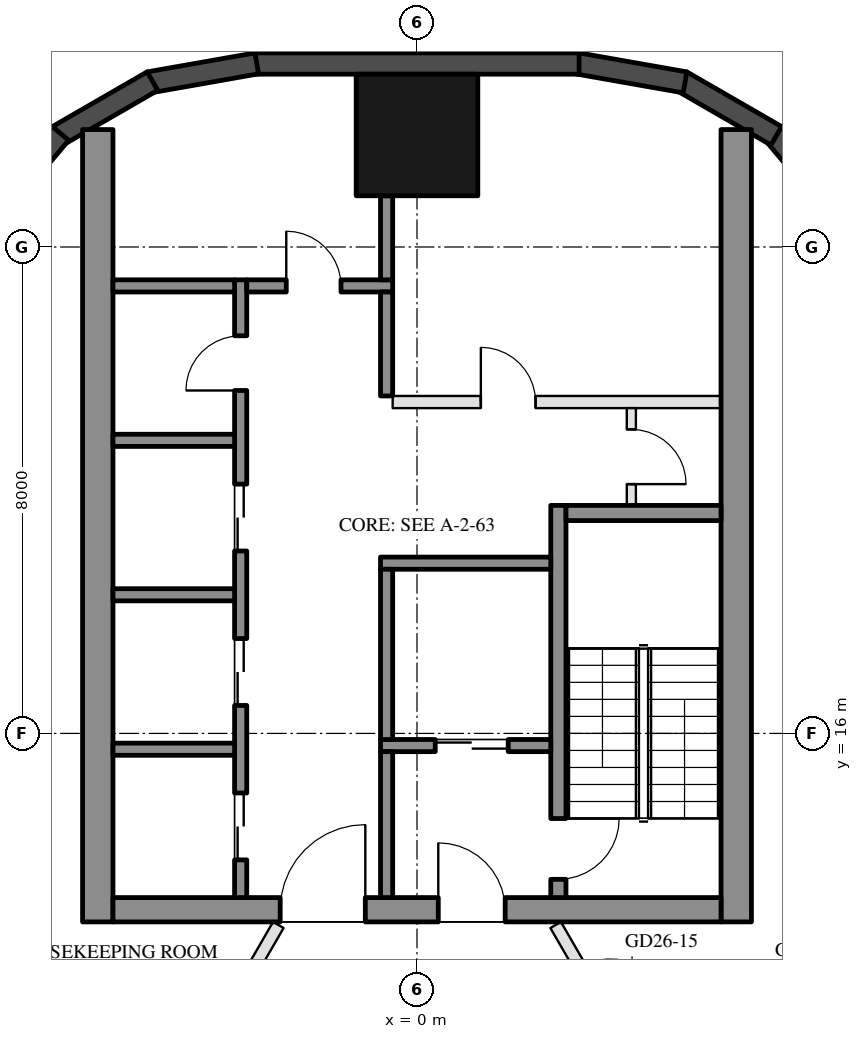
"""IFC4 building model, lengths in metres.
Left out: names, types, materials, properties, quantities, classifications, styles, units other than length and angle.
Written with IfcOpenShell. Run it as: python <this file> out.ifc"""

import sys

from ifc_helpers import new_model, si_unit, direction, frame, frame_2d, origin, origin_2d, place, context, subcontext, project, spatial, rectangle, hollow_rectangle, extrude, boolean, halfspace, element, fill, save


model = new_model("IFC4")
c1 = context("Model", 3, precision=1e-05, world=origin(), true_north=direction((0.0, 1.0)))
c2 = subcontext(c1, "Body", "Model", "MODEL_VIEW")
j1 = project(units=[si_unit("LENGTHUNIT", "METRE"), si_unit("PLANEANGLEUNIT", "RADIAN")], contexts=[c1])
p1 = place(None, origin())
s1 = spatial("IfcSite", under=j1, at=p1, CompositionType="ELEMENT")
p2 = place(p1, origin())
s2 = spatial("IfcBuilding", under=s1, at=p2, CompositionType="ELEMENT")
p3 = place(p2, frame((0.0, 0.0, 272.6)))
s3 = spatial("IfcBuildingStorey", under=s2, at=p3, CompositionType="ELEMENT", Elevation=272.6)
p4 = place(p3, frame((0.0, 25.843, 0.0), z_axis=(0.0, 0.0, 1.0), x_axis=(1.0, 0.0, 0.0)))
e1 = element("IfcColumn", 1, at=p4, inside=s3, PredefinedType="COLUMN", context=c2, shape_type="SweptSolid", body=[
    boolean("DIFFERENCE", extrude(hollow_rectangle(XDim=2.0, YDim=2.0, WallThickness=0.05, at=origin_2d()), origin(), (0.0, 0.0, 1.0), 3.7), halfspace(frame((0.0, 0.0, 3.587), z_axis=(0.0, 0.0, 1.0), x_axis=(1.0, 0.0, 0.0)), False)),
])
p5 = place(p3, frame((7.019, 24.489, 0.0), z_axis=(0.0, 0.0, 1.0), x_axis=(-0.642756114672, 0.766070869471, 0.0)))
e2 = element("IfcWall", 2, at=p5, inside=s3, PredefinedType="SOLIDWALL", context=c2, shape_type="SweptSolid", body=[
    extrude(rectangle(XDim=1.8, YDim=0.35, at=frame_2d((0.9, 0.0))), origin(), (0.0, 0.0, 1.0), 3.55),
])
for number, where, z_axis, x_axis in (
    (3, (5.909, 25.829, 0.0), (0.0, 0.0, 1.0), (-0.866, 0.5, 0.0)),
    (4, (4.408, 26.708, 0.0), (0.0, 0.0, 1.0), (-0.985, 0.174, 0.0)),
):
    element("IfcWall", number, at=place(p3, frame(where, z_axis=z_axis, x_axis=x_axis)), inside=s3, PredefinedType="SOLIDWALL", context=c2, shape_type="SweptSolid", body=[
        extrude(rectangle(XDim=1.8, YDim=0.35, at=frame_2d((0.9, 0.0))), origin(), (0.0, 0.0, 1.0), 3.55),
    ])
p6 = place(p3, frame((2.666, 27.018, 0.0), z_axis=(0.0, 0.0, 1.0), x_axis=(-1.0, 0.0, 0.0)))
e5 = element("IfcWall", 5, at=p6, inside=s3, PredefinedType="SOLIDWALL", context=c2, shape_type="SweptSolid", body=[
    extrude(rectangle(XDim=5.331, YDim=0.35, at=frame_2d((2.666, 0.0))), origin(), (0.0, 0.0, 1.0), 3.55),
])
for number, where, z_axis, x_axis in (
    (6, (-2.635, 27.02, 0.0), (0.0, 0.0, 1.0), (-0.985, -0.174, 0.0)),
    (7, (-4.351, 26.729, 0.0), (0.0, 0.0, 1.0), (-0.866, -0.5, 0.0)),
):
    element("IfcWall", number, at=place(p3, frame(where, z_axis=z_axis, x_axis=x_axis)), inside=s3, PredefinedType="SOLIDWALL", context=c2, shape_type="SweptSolid", body=[
        extrude(rectangle(XDim=1.8, YDim=0.35, at=frame_2d((0.9, 0.0))), origin(), (0.0, 0.0, 1.0), 3.55),
    ])
p7 = place(p3, frame((-5.863, 25.868, 0.0), z_axis=(0.0, 0.0, 1.0), x_axis=(-0.642756114672, -0.766070869471, 0.0)))
e8 = element("IfcWall", 8, at=p7, inside=s3, PredefinedType="SOLIDWALL", context=c2, shape_type="SweptSolid", body=[
    extrude(rectangle(XDim=1.8, YDim=0.35, at=frame_2d((0.9, 0.0))), origin(), (0.0, 0.0, 1.0), 3.55),
])
for number, where, z_axis, x_axis in (
    (9, (5.25, 12.9, 0.0), (0.0, 0.0, 1.0), (0.0, 1.0, 0.0)),
    (10, (-5.25, 12.9, 0.0), (0.0, 0.0, 1.0), (0.0, 1.0, 0.0)),
):
    element("IfcWall", number, at=place(p3, frame(where, z_axis=z_axis, x_axis=x_axis)), inside=s3, PredefinedType="SHEAR", context=c2, shape_type="SweptSolid", body=[
        extrude(rectangle(XDim=13.031, YDim=0.5, at=frame_2d((6.516, 0.0))), origin(), (0.0, 0.0, 1.0), 3.5),
    ])
p8 = place(p3, frame((5.0, 13.1, 0.0), z_axis=(0.0, 0.0, 1.0), x_axis=(-1.0, 0.0, 0.0)))
e11 = element("IfcWall", 11, at=p8, inside=s3, PredefinedType="SHEAR", context=c2, shape_type="SweptSolid", body=[
    extrude(rectangle(XDim=10.0, YDim=0.4, at=frame_2d((5.0, 0.0))), origin(), (0.0, 0.0, 1.0), 3.5),
])
p9 = place(p8, frame((3.55, 0.0, 0.0)))
e12 = element("IfcOpeningElement", 12, at=p9, cuts=e11, PredefinedType="OPENING", context=c2, shape_type="SweptSolid", body=[
    extrude(rectangle(XDim=1.1, YDim=2.1, at=frame_2d((0.55, 1.05))), frame((0.0, 0.21, 0.0), z_axis=(0.0, -1.0, 0.0), x_axis=(1.0, 0.0, 0.0)), (0.0, 0.0, 1.0), 0.42),
])
p10 = place(p8, frame((5.85, 0.0, 0.0)))
e13 = element("IfcOpeningElement", 13, at=p10, cuts=e11, PredefinedType="OPENING", context=c2, shape_type="SweptSolid", body=[
    extrude(rectangle(XDim=1.4, YDim=2.1, at=frame_2d((0.7, 1.05))), frame((0.0, 0.21, 0.0), z_axis=(0.0, -1.0, 0.0), x_axis=(1.0, 0.0, 0.0)), (0.0, 0.0, 1.0), 0.42),
])
p11 = place(p3, frame((2.325, 13.3, 0.0), z_axis=(0.0, 0.0, 1.0), x_axis=(0.0, 1.0, 0.0)))
e14 = element("IfcWall", 14, at=p11, inside=s3, PredefinedType="SHEAR", context=c2, shape_type="SweptSolid", body=[
    extrude(rectangle(XDim=6.45, YDim=0.25, at=frame_2d((3.225, 0.0))), origin(), (0.0, 0.0, 1.0), 3.5),
])
p12 = place(p11, frame((0.3, 0.0, 0.0)))
e15 = element("IfcOpeningElement", 15, at=p12, cuts=e14, PredefinedType="OPENING", context=c2, shape_type="SweptSolid", body=[
    extrude(rectangle(XDim=1.0, YDim=2.1, at=frame_2d((0.5, 1.05))), frame((0.0, 0.135, 0.0), z_axis=(0.0, -1.0, 0.0), x_axis=(1.0, 0.0, 0.0)), (0.0, 0.0, 1.0), 0.27),
])
p13 = place(p3, frame((5.0, 19.625, 0.0), z_axis=(0.0, 0.0, 1.0), x_axis=(-1.0, 0.0, 0.0)))
e16 = element("IfcWall", 16, at=p13, inside=s3, PredefinedType="SHEAR", context=c2, shape_type="SweptSolid", body=[
    extrude(rectangle(XDim=2.55, YDim=0.25, at=frame_2d((1.275, 0.0))), origin(), (0.0, 0.0, 1.0), 3.5),
])
p14 = place(p3, frame((2.2, 18.8, 0.0), z_axis=(0.0, 0.0, 1.0), x_axis=(-1.0, 0.0, 0.0)))
e17 = element("IfcWall", 17, at=p14, inside=s3, PredefinedType="SHEAR", context=c2, shape_type="SweptSolid", body=[
    extrude(rectangle(XDim=2.8, YDim=0.2, at=frame_2d((1.4, 0.0))), origin(), (0.0, 0.0, 1.0), 3.5),
])
p15 = place(p3, frame((2.2, 15.8, 0.0), z_axis=(0.0, 0.0, 1.0), x_axis=(-1.0, 0.0, 0.0)))
e18 = element("IfcWall", 18, at=p15, inside=s3, PredefinedType="SHEAR", context=c2, shape_type="SweptSolid", body=[
    extrude(rectangle(XDim=2.8, YDim=0.2, at=frame_2d((1.4, 0.0))), origin(), (0.0, 0.0, 1.0), 3.5),
])
p16 = place(p15, frame((0.7, 0.0, 0.0)))
e19 = element("IfcOpeningElement", 19, at=p16, cuts=e18, PredefinedType="OPENING", context=c2, shape_type="SweptSolid", body=[
    extrude(rectangle(XDim=1.2, YDim=2.1, at=frame_2d((0.6, 1.05))), frame((0.0, 0.11, 0.0), z_axis=(0.0, -1.0, 0.0), x_axis=(1.0, 0.0, 0.0)), (0.0, 0.0, 1.0), 0.22),
])
p17 = place(p3, frame((-0.5, 15.9, 0.0), z_axis=(0.0, 0.0, 1.0), x_axis=(0.0, 1.0, 0.0)))
e20 = element("IfcWall", 20, at=p17, inside=s3, PredefinedType="SHEAR", context=c2, shape_type="SweptSolid", body=[
    extrude(rectangle(XDim=2.8, YDim=0.2, at=frame_2d((1.4, 0.0))), origin(), (0.0, 0.0, 1.0), 3.5),
])
p18 = place(p3, frame((-0.5, 13.3, 0.0), z_axis=(0.0, 0.0, 1.0), x_axis=(0.0, 1.0, 0.0)))
e21 = element("IfcWall", 21, at=p18, inside=s3, PredefinedType="SHEAR", context=c2, shape_type="SweptSolid", body=[
    extrude(rectangle(XDim=2.4, YDim=0.2, at=frame_2d((1.2, 0.0))), origin(), (0.0, 0.0, 1.0), 3.5),
])
p19 = place(p3, frame((-2.9, 13.3, 0.0), z_axis=(0.0, 0.0, 1.0), x_axis=(0.0, 1.0, 0.0)))
e22 = element("IfcWall", 22, at=p19, inside=s3, PredefinedType="SHEAR", context=c2, shape_type="SweptSolid", body=[
    extrude(rectangle(XDim=10.16, YDim=0.2, at=frame_2d((5.08, 0.0))), origin(), (0.0, 0.0, 1.0), 3.5),
])
p20 = place(p19, frame((0.62, 0.0, 0.0)))
e23 = element("IfcOpeningElement", 23, at=p20, cuts=e22, PredefinedType="OPENING", context=c2, shape_type="SweptSolid", body=[
    extrude(rectangle(XDim=1.1, YDim=2.1, at=frame_2d((0.55, 1.05))), frame((0.0, 0.11, 0.0), z_axis=(0.0, -1.0, 0.0), x_axis=(1.0, 0.0, 0.0)), (0.0, 0.0, 1.0), 0.22),
])
p21 = place(p19, frame((3.16, 0.0, 0.0)))
e24 = element("IfcOpeningElement", 24, at=p21, cuts=e22, PredefinedType="OPENING", context=c2, shape_type="SweptSolid", body=[
    extrude(rectangle(XDim=1.1, YDim=2.1, at=frame_2d((0.55, 1.05))), frame((0.0, 0.11, 0.0), z_axis=(0.0, -1.0, 0.0), x_axis=(1.0, 0.0, 0.0)), (0.0, 0.0, 1.0), 0.22),
])
p22 = place(p19, frame((5.7, 0.0, 0.0)))
e25 = element("IfcOpeningElement", 25, at=p22, cuts=e22, PredefinedType="OPENING", context=c2, shape_type="SweptSolid", body=[
    extrude(rectangle(XDim=1.1, YDim=2.1, at=frame_2d((0.55, 1.05))), frame((0.0, 0.11, 0.0), z_axis=(0.0, -1.0, 0.0), x_axis=(1.0, 0.0, 0.0)), (0.0, 0.0, 1.0), 0.22),
])
p23 = place(p19, frame((8.34, 0.0, 0.0)))
e26 = element("IfcOpeningElement", 26, at=p23, cuts=e22, PredefinedType="OPENING", context=c2, shape_type="SweptSolid", body=[
    extrude(rectangle(XDim=0.9, YDim=2.1, at=frame_2d((0.45, 1.05))), frame((0.0, 0.11, 0.0), z_axis=(0.0, -1.0, 0.0), x_axis=(1.0, 0.0, 0.0)), (0.0, 0.0, 1.0), 0.22),
])
p24 = place(p3, frame((-0.4, 23.36, 0.0), z_axis=(0.0, 0.0, 1.0), x_axis=(-1.0, 0.0, 0.0)))
e27 = element("IfcWall", 27, at=p24, inside=s3, PredefinedType="SHEAR", context=c2, shape_type="SweptSolid", body=[
    extrude(rectangle(XDim=2.4, YDim=0.2, at=frame_2d((1.2, 0.0))), origin(), (0.0, 0.0, 1.0), 3.5),
])
p25 = place(p24, frame((0.85, 0.0, 0.0)))
e28 = element("IfcOpeningElement", 28, at=p25, cuts=e27, PredefinedType="OPENING", context=c2, shape_type="SweptSolid", body=[
    extrude(rectangle(XDim=0.9, YDim=2.1, at=frame_2d((0.45, 1.05))), frame((0.0, 0.11, 0.0), z_axis=(0.0, -1.0, 0.0), x_axis=(1.0, 0.0, 0.0)), (0.0, 0.0, 1.0), 0.22),
])
p26 = place(p3, frame((-0.5, 21.55, 0.0), z_axis=(0.0, 0.0, 1.0), x_axis=(0.0, 1.0, 0.0)))
e29 = element("IfcWall", 29, at=p26, inside=s3, PredefinedType="SHEAR", context=c2, shape_type="SweptSolid", body=[
    extrude(rectangle(XDim=1.71, YDim=0.2, at=frame_2d((0.855, 0.0))), origin(), (0.0, 0.0, 1.0), 3.5),
])
for number, where, z_axis, x_axis in (
    (30, (-3.0, 15.74, 0.0), (0.0, 0.0, 1.0), (-1.0, 0.0, 0.0)),
    (31, (-3.0, 18.28, 0.0), (0.0, 0.0, 1.0), (-1.0, 0.0, 0.0)),
    (32, (-3.0, 20.82, 0.0), (0.0, 0.0, 1.0), (-1.0, 0.0, 0.0)),
    (33, (-3.0, 23.36, 0.0), (0.0, 0.0, 1.0), (-1.0, 0.0, 0.0)),
):
    element("IfcWall", number, at=place(p3, frame(where, z_axis=z_axis, x_axis=x_axis)), inside=s3, PredefinedType="SHEAR", context=c2, shape_type="SweptSolid", body=[
        extrude(rectangle(XDim=2.0, YDim=0.2, at=frame_2d((1.0, 0.0))), origin(), (0.0, 0.0, 1.0), 3.5),
    ])
p27 = place(p3, frame((-0.5, 23.46, 0.0), z_axis=(0.0, 0.0, 1.0), x_axis=(0.0, 1.0, 0.0)))
e34 = element("IfcWall", 34, at=p27, inside=s3, PredefinedType="SHEAR", context=c2, shape_type="SweptSolid", body=[
    extrude(rectangle(XDim=1.383, YDim=0.2, at=frame_2d((0.691, 0.0))), origin(), (0.0, 0.0, 1.0), 3.5),
])
p28 = place(p3, frame((5.0, 21.45, 0.0), z_axis=(0.0, 0.0, 1.0), x_axis=(-1.0, 0.0, 0.0)))
e35 = element("IfcWall", 35, at=p28, inside=s3, PredefinedType="PARTITIONING", context=c2, shape_type="SweptSolid", body=[
    extrude(rectangle(XDim=5.4, YDim=0.2, at=frame_2d((2.7, 0.0))), origin(), (0.0, 0.0, 1.0), 3.5),
])
p29 = place(p28, frame((3.05, 0.0, 0.0)))
e36 = element("IfcOpeningElement", 36, at=p29, cuts=e35, PredefinedType="OPENING", context=c2, shape_type="SweptSolid", body=[
    extrude(rectangle(XDim=0.9, YDim=2.1, at=frame_2d((0.45, 1.05))), frame((0.0, 0.11, 0.0), z_axis=(0.0, -1.0, 0.0), x_axis=(1.0, 0.0, 0.0)), (0.0, 0.0, 1.0), 0.22),
])
p30 = place(p3, frame((3.525, 19.75, 0.0), z_axis=(0.0, 0.0, 1.0), x_axis=(0.0, 1.0, 0.0)))
e37 = element("IfcWall", 37, at=p30, inside=s3, PredefinedType="PARTITIONING", context=c2, shape_type="SweptSolid", body=[
    extrude(rectangle(XDim=1.6, YDim=0.15, at=frame_2d((0.8, 0.0))), origin(), (0.0, 0.0, 1.0), 3.5),
])
p31 = place(p30, frame((0.35, 0.0, 0.0)))
e38 = element("IfcOpeningElement", 38, at=p31, cuts=e37, PredefinedType="OPENING", context=c2, shape_type="SweptSolid", body=[
    extrude(rectangle(XDim=0.9, YDim=2.1, at=frame_2d((0.45, 1.05))), frame((0.0, 0.085, 0.0), z_axis=(0.0, -1.0, 0.0), x_axis=(1.0, 0.0, 0.0)), (0.0, 0.0, 1.0), 0.17),
])
p32 = place(p3, frame((12.715, 14.269, 0.0), z_axis=(0.0, 0.0, 1.0), x_axis=(-0.866024954444, -0.500000778279, 0.0)))
e39 = element("IfcWall", 39, at=p32, inside=s3, PredefinedType="PARTITIONING", context=c2, shape_type="SweptSolid", body=[
    extrude(rectangle(XDim=9.846, YDim=0.2, at=frame_2d((4.923, 0.0))), origin(), (0.0, 0.0, 1.0), 3.1),
])
p33 = place(p3, frame((13.726, 12.518, 0.0), z_axis=(0.0, 0.0, 1.0), x_axis=(-0.859340362174, -0.511404088699, 0.0)))
e40 = element("IfcWall", 40, at=p33, inside=s3, PredefinedType="PARTITIONING", context=c2, shape_type="SweptSolid", body=[
    extrude(rectangle(XDim=9.847, YDim=0.15, at=frame_2d((4.923, 0.0))), origin(), (0.0, 0.0, 1.0), 3.0),
])
p34 = place(p3, frame((2.281, 12.85, 0.0), z_axis=(0.0, 0.0, 1.0), x_axis=(0.500008716408, -0.866020371305, 0.0)))
e41 = element("IfcWall", 41, at=p34, inside=s3, PredefinedType="PARTITIONING", context=c2, shape_type="SweptSolid", body=[
    extrude(rectangle(XDim=3.888, YDim=0.2, at=frame_2d((1.944, 0.0))), origin(), (0.0, 0.0, 1.0), 3.0),
])
p35 = place(p34, frame((0.8, 0.0, 0.0)))
e42 = element("IfcOpeningElement", 42, at=p35, cuts=e41, PredefinedType="OPENING", context=c2, shape_type="SweptSolid", body=[
    extrude(rectangle(XDim=1.0, YDim=2.1, at=frame_2d((0.5, 1.05))), frame((0.0, 0.11, 0.0), z_axis=(0.0, -1.0, 0.0), x_axis=(1.0, 0.0, 0.0)), (0.0, 0.0, 1.0), 0.22),
])
p36 = place(p3, frame((-4.97, 8.191, 0.0), z_axis=(0.0, 0.0, 1.0), x_axis=(0.499994808408, 0.866028401131, 0.0)))
e43 = element("IfcWall", 43, at=p36, inside=s3, PredefinedType="PARTITIONING", context=c2, shape_type="SweptSolid", body=[
    extrude(rectangle(XDim=5.38, YDim=0.2, at=frame_2d((2.69, 0.0))), origin(), (0.0, 0.0, 1.0), 3.0),
])
p37 = place(p36, frame((2.19, 0.0, 0.0)))
e44 = element("IfcOpeningElement", 44, at=p37, cuts=e43, PredefinedType="OPENING", context=c2, shape_type="SweptSolid", body=[
    extrude(rectangle(XDim=1.0, YDim=2.1, at=frame_2d((0.5, 1.05))), frame((0.0, 0.11, 0.0), z_axis=(0.0, -1.0, 0.0), x_axis=(1.0, 0.0, 0.0)), (0.0, 0.0, 1.0), 0.22),
])
p38 = place(p16, origin())
e45 = element("IfcDoor", 45, at=p38, inside=s3, OperationType="DOUBLE_DOOR_SLIDING", PredefinedType="DOOR", context=c2, shape_type="SweptSolid", body=[
    extrude(rectangle(XDim=1.2, YDim=2.1, at=frame_2d((0.6, 1.05))), frame((0.0, 0.025, 0.0), z_axis=(0.0, -1.0, 0.0), x_axis=(1.0, 0.0, 0.0)), (0.0, 0.0, 1.0), 0.05),
])
fill(e19, e45)
p39 = place(p31, frame((0.9, 0.0, 0.0), z_axis=(0.0, 0.0, 1.0), x_axis=(-1.0, 0.0, 0.0)))
e46 = element("IfcDoor", 46, at=p39, inside=s3, OperationType="SINGLE_SWING_RIGHT", PredefinedType="DOOR", context=c2, shape_type="SweptSolid", body=[
    extrude(rectangle(XDim=0.9, YDim=2.1, at=frame_2d((0.45, 1.05))), frame((0.0, 0.025, 0.0), z_axis=(0.0, -1.0, 0.0), x_axis=(1.0, 0.0, 0.0)), (0.0, 0.0, 1.0), 0.05),
])
fill(e38, e46)
p40 = place(p20, origin())
e47 = element("IfcDoor", 47, at=p40, inside=s3, OperationType="DOUBLE_DOOR_SLIDING", PredefinedType="DOOR", context=c2, shape_type="SweptSolid", body=[
    extrude(rectangle(XDim=1.1, YDim=2.1, at=frame_2d((0.55, 1.05))), frame((0.0, 0.025, 0.0), z_axis=(0.0, -1.0, 0.0), x_axis=(1.0, 0.0, 0.0)), (0.0, 0.0, 1.0), 0.05),
])
fill(e23, e47)
p41 = place(p21, origin())
e48 = element("IfcDoor", 48, at=p41, inside=s3, OperationType="DOUBLE_DOOR_SLIDING", PredefinedType="DOOR", context=c2, shape_type="SweptSolid", body=[
    extrude(rectangle(XDim=1.1, YDim=2.1, at=frame_2d((0.55, 1.05))), frame((0.0, 0.025, 0.0), z_axis=(0.0, -1.0, 0.0), x_axis=(1.0, 0.0, 0.0)), (0.0, 0.0, 1.0), 0.05),
])
fill(e24, e48)
p42 = place(p22, origin())
e49 = element("IfcDoor", 49, at=p42, inside=s3, OperationType="DOUBLE_DOOR_SLIDING", PredefinedType="DOOR", context=c2, shape_type="SweptSolid", body=[
    extrude(rectangle(XDim=1.1, YDim=2.1, at=frame_2d((0.55, 1.05))), frame((0.0, 0.025, 0.0), z_axis=(0.0, -1.0, 0.0), x_axis=(1.0, 0.0, 0.0)), (0.0, 0.0, 1.0), 0.05),
])
fill(e25, e49)
p43 = place(p23, origin())
e50 = element("IfcDoor", 50, at=p43, inside=s3, OperationType="SINGLE_SWING_LEFT", PredefinedType="DOOR", context=c2, shape_type="SweptSolid", body=[
    extrude(rectangle(XDim=0.9, YDim=2.1, at=frame_2d((0.45, 1.05))), frame((0.0, 0.025, 0.0), z_axis=(0.0, -1.0, 0.0), x_axis=(1.0, 0.0, 0.0)), (0.0, 0.0, 1.0), 0.05),
])
fill(e26, e50)
p44 = place(p25, frame((0.9, 0.0, 0.0), z_axis=(0.0, 0.0, 1.0), x_axis=(-1.0, 0.0, 0.0)))
e51 = element("IfcDoor", 51, at=p44, inside=s3, OperationType="SINGLE_SWING_LEFT", PredefinedType="DOOR", context=c2, shape_type="SweptSolid", body=[
    extrude(rectangle(XDim=0.9, YDim=2.1, at=frame_2d((0.45, 1.05))), frame((0.0, 0.025, 0.0), z_axis=(0.0, -1.0, 0.0), x_axis=(1.0, 0.0, 0.0)), (0.0, 0.0, 1.0), 0.05),
])
fill(e28, e51)
p45 = place(p29, frame((0.9, 0.0, 0.0), z_axis=(0.0, 0.0, 1.0), x_axis=(-1.0, 0.0, 0.0)))
e52 = element("IfcDoor", 52, at=p45, inside=s3, OperationType="SINGLE_SWING_LEFT", PredefinedType="DOOR", context=c2, shape_type="SweptSolid", body=[
    extrude(rectangle(XDim=0.9, YDim=2.1, at=frame_2d((0.45, 1.05))), frame((0.0, 0.025, 0.0), z_axis=(0.0, -1.0, 0.0), x_axis=(1.0, 0.0, 0.0)), (0.0, 0.0, 1.0), 0.05),
])
fill(e36, e52)
p46 = place(p9, frame((1.1, 0.0, 0.0), z_axis=(0.0, 0.0, 1.0), x_axis=(-1.0, 0.0, 0.0)))
e53 = element("IfcDoor", 53, at=p46, inside=s3, OperationType="SINGLE_SWING_LEFT", PredefinedType="DOOR", context=c2, shape_type="SweptSolid", body=[
    extrude(rectangle(XDim=1.1, YDim=2.1, at=frame_2d((0.55, 1.05))), frame((0.0, 0.025, 0.0), z_axis=(0.0, -1.0, 0.0), x_axis=(1.0, 0.0, 0.0)), (0.0, 0.0, 1.0), 0.05),
])
fill(e12, e53)
p47 = place(p10, frame((1.4, 0.0, 0.0), z_axis=(0.0, 0.0, 1.0), x_axis=(-1.0, 0.0, 0.0)))
e54 = element("IfcDoor", 54, at=p47, inside=s3, OperationType="DOUBLE_DOOR_SINGLE_SWING", PredefinedType="DOOR", context=c2, shape_type="SweptSolid", body=[
    extrude(rectangle(XDim=1.4, YDim=2.1, at=frame_2d((0.7, 1.05))), frame((0.0, 0.025, 0.0), z_axis=(0.0, -1.0, 0.0), x_axis=(1.0, 0.0, 0.0)), (0.0, 0.0, 1.0), 0.05),
])
fill(e13, e54)
p48 = place(p12, frame((1.0, 0.0, 0.0), z_axis=(0.0, 0.0, 1.0), x_axis=(-1.0, 0.0, 0.0)))
e55 = element("IfcDoor", 55, at=p48, inside=s3, OperationType="SINGLE_SWING_LEFT", PredefinedType="DOOR", context=c2, shape_type="SweptSolid", body=[
    extrude(rectangle(XDim=1.0, YDim=2.1, at=frame_2d((0.5, 1.05))), frame((0.0, 0.025, 0.0), z_axis=(0.0, -1.0, 0.0), x_axis=(1.0, 0.0, 0.0)), (0.0, 0.0, 1.0), 0.05),
])
fill(e15, e55)
save(model, sys.argv[1])
